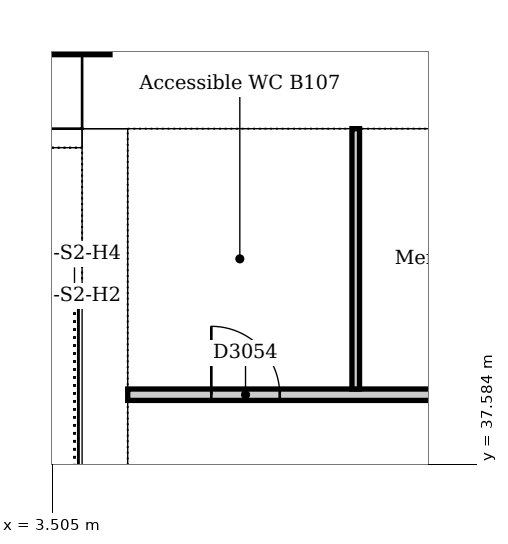
"""IFC4 building model, lengths in metres.
Left out: names, types, materials, properties, quantities, classifications, styles, units other than length and angle.
Written with IfcOpenShell. Run it as: python <this file> out.ifc"""

import sys

from ifc_helpers import new_model, si_unit, direction, frame, frame_2d, origin, origin_2d, place, context, subcontext, project, spatial, rectangle, extrude, element, fill, save


model = new_model("IFC4")
c1 = context("Model", 3, precision=1e-05, world=origin(), true_north=direction((0.0, 1.0)))
c2 = subcontext(c1, "Body", "Model", "MODEL_VIEW")
j1 = project(units=[si_unit("LENGTHUNIT", "METRE"), si_unit("PLANEANGLEUNIT", "RADIAN")], contexts=[c1])
p1 = place(None, origin())
s1 = spatial("IfcSite", under=j1, at=p1, CompositionType="ELEMENT")
p2 = place(p1, origin())
s2 = spatial("IfcBuilding", under=s1, at=p2, CompositionType="ELEMENT")
p3 = place(p2, frame((0.0, 0.0, -5.0)))
s3 = spatial("IfcBuildingStorey", under=s2, at=p3, CompositionType="ELEMENT", Elevation=-5.0)
p4 = place(p3, frame((23.7, 42.6, 0.0), z_axis=(0.0, 0.0, 1.0), x_axis=(-1.0, 0.0, 0.0)))
e1 = element("IfcWall", 1, at=p4, inside=s3, PredefinedType="SOLIDWALL", context=c2, shape_type="SweptSolid", body=[
    extrude(rectangle(XDim=19.8, YDim=1.2, at=frame_2d((9.9, 0.0))), origin(), (0.0, 0.0, 1.0), 5.0),
])
p5 = place(p3, frame((4.2, 42.0, 0.0), z_axis=(0.0, 0.0, 1.0), x_axis=(0.0, -1.0, 0.0)))
e2 = element("IfcWall", 2, at=p5, inside=s3, PredefinedType="SOLIDWALL", context=c2, shape_type="SweptSolid", body=[
    extrude(rectangle(XDim=10.5, YDim=0.6, at=frame_2d((5.25, 0.0))), origin(), (0.0, 0.0, 1.0), 5.0),
])
p6 = place(p5, frame((5.3, 0.0, 0.0)))
e3 = element("IfcOpeningElement", 3, at=p6, cuts=e2, PredefinedType="OPENING", context=c2, shape_type="SweptSolid", body=[
    extrude(rectangle(XDim=1.0, YDim=2.1, at=frame_2d((0.5, 1.05))), frame((0.0, 0.31, 0.0), z_axis=(0.0, -1.0, 0.0), x_axis=(1.0, 0.0, 0.0)), (0.0, 0.0, 1.0), 0.62),
])
p7 = place(p3, frame((3.9, 41.875, 0.0), z_axis=(0.0, 0.0, 1.0), x_axis=(-1.0, 0.0, 0.0)))
e4 = element("IfcWall", 4, at=p7, inside=s3, PredefinedType="SOLIDWALL", context=c2, shape_type="SweptSolid", body=[
    extrude(rectangle(XDim=3.54, YDim=0.25, at=frame_2d((1.77, 0.0))), origin(), (0.0, 0.0, 1.0), 5.0),
])
p8 = place(p3, frame((3.667, 43.574, 0.0), z_axis=(0.0, 0.0, 1.0), x_axis=(1.0, 0.0, 0.0)))
e5 = element("IfcColumn", 5, at=p8, inside=s3, PredefinedType="COLUMN", context=c2, shape_type="SweptSolid", body=[
    extrude(rectangle(XDim=1.2, YDim=1.2, at=origin_2d()), origin(), (0.0, 0.0, 1.0), 4.7),
])
p9 = place(p3, frame((4.5, 38.5, 0.0), z_axis=(0.0, 0.0, 1.0), x_axis=(1.0, 0.0, 0.0)))
e6 = element("IfcWall", 6, at=p9, inside=s3, PredefinedType="PARTITIONING", context=c2, shape_type="SweptSolid", body=[
    extrude(rectangle(XDim=11.9, YDim=0.15, at=frame_2d((5.95, 0.0))), origin(), (0.0, 0.0, 1.0), 4.7),
])
p10 = place(p9, frame((1.1, 0.0, 0.0)))
e7 = element("IfcOpeningElement", 7, at=p10, cuts=e6, PredefinedType="OPENING", context=c2, shape_type="SweptSolid", body=[
    extrude(rectangle(XDim=0.9, YDim=2.1, at=frame_2d((0.45, 1.05))), frame((0.0, 0.085, 0.0), z_axis=(0.0, -1.0, 0.0), x_axis=(1.0, 0.0, 0.0)), (0.0, 0.0, 1.0), 0.17),
])
p11 = place(p9, frame((4.05, 0.0, 0.0)))
e8 = element("IfcOpeningElement", 8, at=p11, cuts=e6, PredefinedType="OPENING", context=c2, shape_type="SweptSolid", body=[
    extrude(rectangle(XDim=0.9, YDim=2.1, at=frame_2d((0.45, 1.05))), frame((0.0, 0.085, 0.0), z_axis=(0.0, -1.0, 0.0), x_axis=(1.0, 0.0, 0.0)), (0.0, 0.0, 1.0), 0.17),
])
p12 = place(p9, frame((7.05, 0.0, 0.0)))
e9 = element("IfcOpeningElement", 9, at=p12, cuts=e6, PredefinedType="OPENING", context=c2, shape_type="SweptSolid", body=[
    extrude(rectangle(XDim=0.9, YDim=2.1, at=frame_2d((0.45, 1.05))), frame((0.0, 0.085, 0.0), z_axis=(0.0, -1.0, 0.0), x_axis=(1.0, 0.0, 0.0)), (0.0, 0.0, 1.0), 0.17),
])
p13 = place(p9, frame((9.95, 0.0, 0.0)))
e10 = element("IfcOpeningElement", 10, at=p13, cuts=e6, PredefinedType="OPENING", context=c2, shape_type="SweptSolid", body=[
    extrude(rectangle(XDim=0.8, YDim=2.1, at=frame_2d((0.4, 1.05))), frame((0.0, 0.085, 0.0), z_axis=(0.0, -1.0, 0.0), x_axis=(1.0, 0.0, 0.0)), (0.0, 0.0, 1.0), 0.17),
])
p14 = place(p3, frame((7.5, 38.575, 0.0), z_axis=(0.0, 0.0, 1.0), x_axis=(0.0, 1.0, 0.0)))
e11 = element("IfcWall", 11, at=p14, inside=s3, PredefinedType="PARTITIONING", context=c2, shape_type="SweptSolid", body=[
    extrude(rectangle(XDim=3.425, YDim=0.1, at=frame_2d((1.712, 0.0))), origin(), (0.0, 0.0, 1.0), 4.7),
])
p15 = place(p10, origin())
e12 = element("IfcDoor", 12, at=p15, inside=s3, OperationType="SINGLE_SWING_LEFT", PredefinedType="DOOR", context=c2, shape_type="SweptSolid", body=[
    extrude(rectangle(XDim=0.9, YDim=2.1, at=frame_2d((0.45, 1.05))), frame((0.0, 0.025, 0.0), z_axis=(0.0, -1.0, 0.0), x_axis=(1.0, 0.0, 0.0)), (0.0, 0.0, 1.0), 0.05),
])
fill(e7, e12)
save(model, sys.argv[1])
